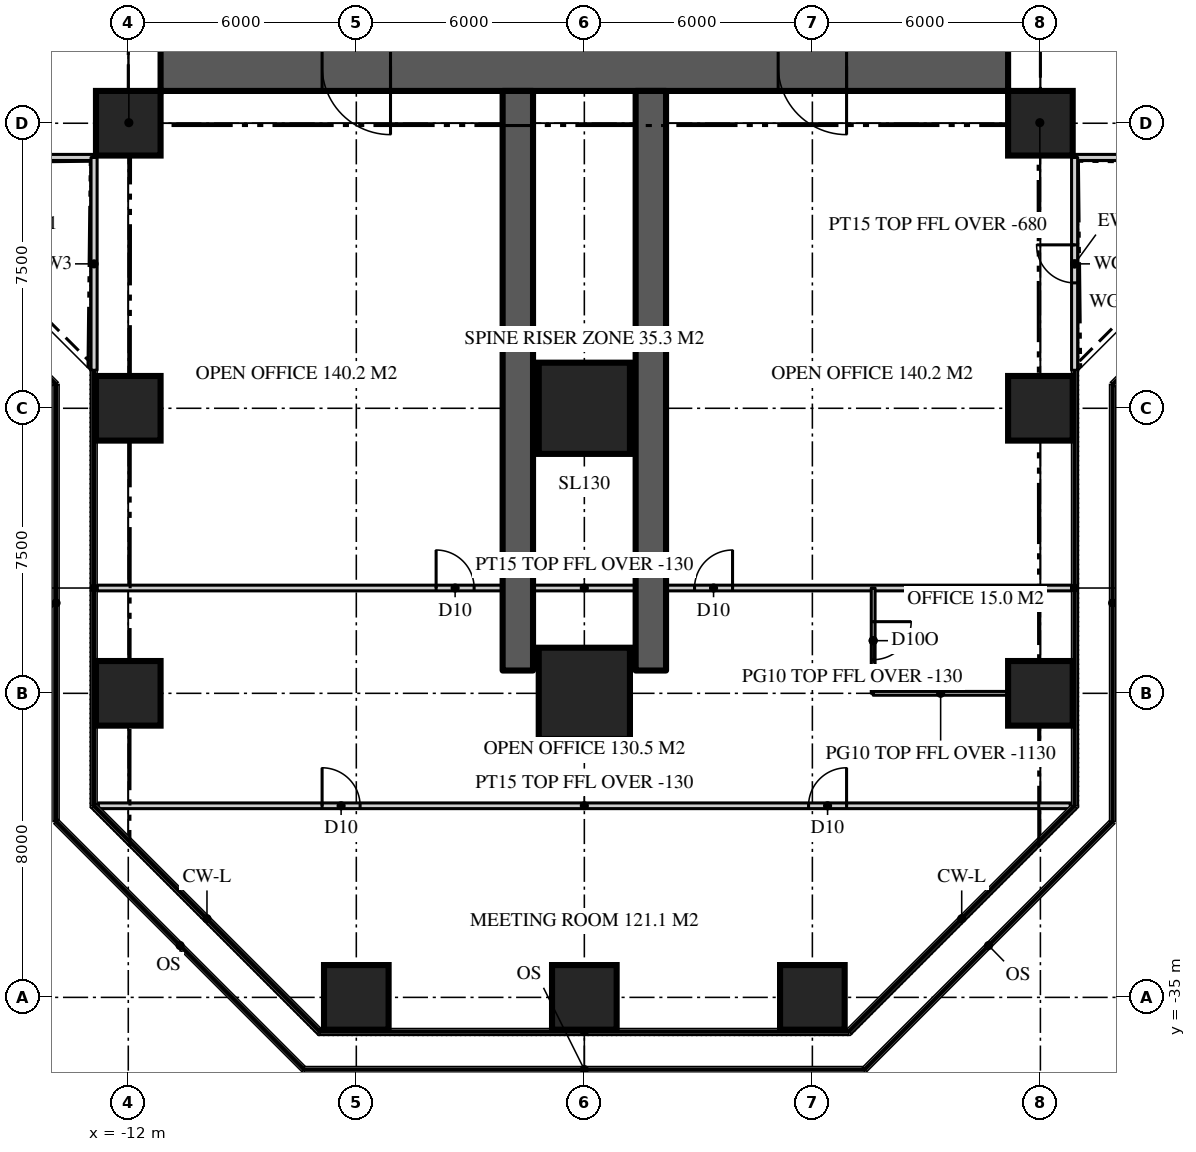
"""IFC4 building model, lengths in metres.
Left out: names, types, materials, properties, quantities, classifications, styles, units other than length and angle.
Written with IfcOpenShell. Run it as: python <this file> out.ifc"""

import sys

from ifc_helpers import new_model, si_unit, direction, frame, frame_2d, origin, origin_2d, place, context, subcontext, project, spatial, rectangle, extrude, element, fill, save


model = new_model("IFC4")
c1 = context("Model", 3, precision=1e-05, world=origin(), true_north=direction((0.0, 1.0)))
c2 = subcontext(c1, "Body", "Model", "MODEL_VIEW")
j1 = project(units=[si_unit("LENGTHUNIT", "METRE"), si_unit("PLANEANGLEUNIT", "RADIAN")], contexts=[c1])
p1 = place(None, origin())
s1 = spatial("IfcSite", under=j1, at=p1, CompositionType="ELEMENT")
p2 = place(p1, origin())
s2 = spatial("IfcBuilding", under=s1, at=p2, CompositionType="ELEMENT")
p3 = place(p2, frame((0.0, 0.0, 59.1)))
s3 = spatial("IfcBuildingStorey", under=s2, at=p3, CompositionType="ELEMENT", Elevation=59.1)
p4 = place(p3, frame((11.15, -10.5, 0.0), z_axis=(0.0, 0.0, 1.0), x_axis=(-1.0, 0.0, 0.0)))
e1 = element("IfcWall", 1, at=p4, inside=s3, PredefinedType="SHEAR", context=c2, shape_type="SweptSolid", body=[
    extrude(rectangle(XDim=22.3, YDim=1.3, at=frame_2d((11.15, 0.0))), origin(), (0.0, 0.0, 1.0), 3.9),
])
p5 = place(p4, frame((16.25, 0.0, 0.0)))
e2 = element("IfcOpeningElement", 2, at=p5, cuts=e1, PredefinedType="OPENING", context=c2, shape_type="SweptSolid", body=[
    extrude(rectangle(XDim=1.8, YDim=2.2, at=frame_2d((0.9, 1.1))), frame((0.0, 0.66, 0.0), z_axis=(0.0, -1.0, 0.0), x_axis=(1.0, 0.0, 0.0)), (0.0, 0.0, 1.0), 1.32),
])
p6 = place(p4, frame((4.25, 0.0, 0.0)))
e3 = element("IfcOpeningElement", 3, at=p6, cuts=e1, PredefinedType="OPENING", context=c2, shape_type="SweptSolid", body=[
    extrude(rectangle(XDim=1.8, YDim=2.2, at=frame_2d((0.9, 1.1))), frame((0.0, 0.66, 0.0), z_axis=(0.0, -1.0, 0.0), x_axis=(1.0, 0.0, 0.0)), (0.0, 0.0, 1.0), 1.32),
])
for number, where, z_axis, x_axis in (
    (4, (-1.75, -11.15, 0.0), (0.0, 0.0, 1.0), (0.0, -1.0, 0.0)),
    (5, (1.75, -11.15, 0.0), (0.0, 0.0, 1.0), (0.0, -1.0, 0.0)),
):
    element("IfcWall", number, at=place(p3, frame(where, z_axis=z_axis, x_axis=x_axis)), inside=s3, PredefinedType="SHEAR", context=c2, shape_type="SweptSolid", body=[
        extrude(rectangle(XDim=15.25, YDim=0.8, at=frame_2d((7.625, 0.0))), origin(), (0.0, 0.0, 1.0), 3.9),
    ])
for number, where, z_axis, x_axis in (
    (6, (-6.0, -35.0, 0.0), (0.0, 0.0, 1.0), (1.0, 0.0, 0.0)),
    (7, (0.0, -35.0, 0.0), (0.0, 0.0, 1.0), (1.0, 0.0, 0.0)),
    (8, (6.0, -35.0, 0.0), (0.0, 0.0, 1.0), (1.0, 0.0, 0.0)),
    (9, (-12.0, -27.0, 0.0), (0.0, 0.0, 1.0), (1.0, 0.0, 0.0)),
):
    element("IfcColumn", number, at=place(p3, frame(where, z_axis=z_axis, x_axis=x_axis)), inside=s3, PredefinedType="COLUMN", context=c2, shape_type="SweptSolid", body=[
        extrude(rectangle(XDim=1.7, YDim=1.7, at=origin_2d()), origin(), (0.0, 0.0, 1.0), 3.9),
    ])
p7 = place(p3, frame((0.0, -27.0, 0.0), z_axis=(0.0, 0.0, 1.0), x_axis=(1.0, 0.0, 0.0)))
e10 = element("IfcColumn", 10, at=p7, inside=s3, PredefinedType="COLUMN", context=c2, shape_type="SweptSolid", body=[
    extrude(rectangle(XDim=2.4, YDim=2.4, at=origin_2d()), origin(), (0.0, 0.0, 1.0), 3.9),
])
for number, where, z_axis, x_axis in (
    (11, (12.0, -27.0, 0.0), (0.0, 0.0, 1.0), (1.0, 0.0, 0.0)),
    (12, (-12.0, -19.5, 0.0), (0.0, 0.0, 1.0), (1.0, 0.0, 0.0)),
):
    element("IfcColumn", number, at=place(p3, frame(where, z_axis=z_axis, x_axis=x_axis)), inside=s3, PredefinedType="COLUMN", context=c2, shape_type="SweptSolid", body=[
        extrude(rectangle(XDim=1.7, YDim=1.7, at=origin_2d()), origin(), (0.0, 0.0, 1.0), 3.9),
    ])
p8 = place(p3, frame((0.0, -19.5, 0.0), z_axis=(0.0, 0.0, 1.0), x_axis=(1.0, 0.0, 0.0)))
e13 = element("IfcColumn", 13, at=p8, inside=s3, PredefinedType="COLUMN", context=c2, shape_type="SweptSolid", body=[
    extrude(rectangle(XDim=2.4, YDim=2.4, at=origin_2d()), origin(), (0.0, 0.0, 1.0), 3.9),
])
for number, where, z_axis, x_axis in (
    (14, (12.0, -19.5, 0.0), (0.0, 0.0, 1.0), (1.0, 0.0, 0.0)),
    (15, (-12.0, -12.0, 0.0), (0.0, 0.0, 1.0), (1.0, 0.0, 0.0)),
    (16, (12.0, -12.0, 0.0), (0.0, 0.0, 1.0), (1.0, 0.0, 0.0)),
):
    element("IfcColumn", number, at=place(p3, frame(where, z_axis=z_axis, x_axis=x_axis)), inside=s3, PredefinedType="COLUMN", context=c2, shape_type="SweptSolid", body=[
        extrude(rectangle(XDim=1.7, YDim=1.7, at=origin_2d()), origin(), (0.0, 0.0, 1.0), 3.9),
    ])
p9 = place(p3, frame((12.9, -12.9, 0.0), z_axis=(0.0, 0.0, 1.0), x_axis=(1.0, 0.0, 0.0)))
e17 = element("IfcWall", 17, at=p9, inside=s3, PredefinedType="SOLIDWALL", context=c2, shape_type="SweptSolid", body=[
    extrude(rectangle(XDim=5.6, YDim=0.16, at=frame_2d((2.8, 0.0))), origin(), (0.0, 0.0, 1.0), 3.77),
])
p10 = place(p3, frame((-18.5, -12.9, 0.0), z_axis=(0.0, 0.0, 1.0), x_axis=(1.0, 0.0, 0.0)))
e18 = element("IfcWall", 18, at=p10, inside=s3, PredefinedType="SOLIDWALL", context=c2, shape_type="SweptSolid", body=[
    extrude(rectangle(XDim=5.6, YDim=0.16, at=frame_2d((2.8, 0.0))), origin(), (0.0, 0.0, 1.0), 3.77),
])
p11 = place(p10, frame((2.3, 0.0, 0.0)))
e19 = element("IfcOpeningElement", 19, at=p11, cuts=e18, PredefinedType="OPENING", context=c2, shape_type="SweptSolid", body=[
    extrude(rectangle(XDim=1.0, YDim=2.2, at=frame_2d((0.5, 1.1))), frame((0.0, 0.09, 0.0), z_axis=(0.0, -1.0, 0.0), x_axis=(1.0, 0.0, 0.0)), (0.0, 0.0, 1.0), 0.18),
])
p12 = place(p3, frame((-12.9, -12.9, 0.0), z_axis=(0.0, 0.0, 1.0), x_axis=(0.0, -1.0, 0.0)))
e20 = element("IfcWall", 20, at=p12, inside=s3, PredefinedType="SOLIDWALL", context=c2, shape_type="SweptSolid", body=[
    extrude(rectangle(XDim=5.6, YDim=0.16, at=frame_2d((2.8, 0.0))), origin(), (0.0, 0.0, 1.0), 3.77),
])
p13 = place(p3, frame((12.9, -18.5, 0.0), z_axis=(0.0, 0.0, 1.0), x_axis=(0.0, 1.0, 0.0)))
e21 = element("IfcWall", 21, at=p13, inside=s3, PredefinedType="SOLIDWALL", context=c2, shape_type="SweptSolid", body=[
    extrude(rectangle(XDim=5.6, YDim=0.16, at=frame_2d((2.8, 0.0))), origin(), (0.0, 0.0, 1.0), 3.77),
])
p14 = place(p13, frame((2.3, 0.0, 0.0)))
e22 = element("IfcOpeningElement", 22, at=p14, cuts=e21, PredefinedType="OPENING", context=c2, shape_type="SweptSolid", body=[
    extrude(rectangle(XDim=1.0, YDim=2.2, at=frame_2d((0.5, 1.1))), frame((0.0, 0.09, 0.0), z_axis=(0.0, -1.0, 0.0), x_axis=(1.0, 0.0, 0.0)), (0.0, 0.0, 1.0), 0.18),
])
p15 = place(p3, frame((-12.82, -24.229, 0.0), z_axis=(0.0, 0.0, 1.0), x_axis=(1.0, 0.0, 0.0)))
e23 = element("IfcWall", 23, at=p15, inside=s3, PredefinedType="PARTITIONING", context=c2, shape_type="SweptSolid", body=[
    extrude(rectangle(XDim=25.64, YDim=0.15, at=frame_2d((12.82, 0.0))), origin(), (0.0, 0.0, 1.0), 3.77),
])
p16 = place(p15, frame((15.72, 0.0, 0.0)))
e24 = element("IfcOpeningElement", 24, at=p16, cuts=e23, PredefinedType="OPENING", context=c2, shape_type="SweptSolid", body=[
    extrude(rectangle(XDim=1.0, YDim=2.2, at=frame_2d((0.5, 1.1))), frame((0.0, 0.085, 0.0), z_axis=(0.0, -1.0, 0.0), x_axis=(1.0, 0.0, 0.0)), (0.0, 0.0, 1.0), 0.17),
])
p17 = place(p15, frame((8.92, 0.0, 0.0)))
e25 = element("IfcOpeningElement", 25, at=p17, cuts=e23, PredefinedType="OPENING", context=c2, shape_type="SweptSolid", body=[
    extrude(rectangle(XDim=1.0, YDim=2.2, at=frame_2d((0.5, 1.1))), frame((0.0, 0.085, 0.0), z_axis=(0.0, -1.0, 0.0), x_axis=(1.0, 0.0, 0.0)), (0.0, 0.0, 1.0), 0.17),
])
p18 = place(p3, frame((-12.786, -29.959, 0.0), z_axis=(0.0, 0.0, 1.0), x_axis=(1.0, 0.0, 0.0)))
e26 = element("IfcWall", 26, at=p18, inside=s3, PredefinedType="PARTITIONING", context=c2, shape_type="SweptSolid", body=[
    extrude(rectangle(XDim=25.573, YDim=0.15, at=frame_2d((12.786, 0.0))), origin(), (0.0, 0.0, 1.0), 3.77),
])
p19 = place(p18, frame((18.687, 0.0, 0.0)))
e27 = element("IfcOpeningElement", 27, at=p19, cuts=e26, PredefinedType="OPENING", context=c2, shape_type="SweptSolid", body=[
    extrude(rectangle(XDim=1.0, YDim=2.2, at=frame_2d((0.5, 1.1))), frame((0.0, 0.085, 0.0), z_axis=(0.0, -1.0, 0.0), x_axis=(1.0, 0.0, 0.0)), (0.0, 0.0, 1.0), 0.17),
])
p20 = place(p18, frame((5.886, 0.0, 0.0)))
e28 = element("IfcOpeningElement", 28, at=p20, cuts=e26, PredefinedType="OPENING", context=c2, shape_type="SweptSolid", body=[
    extrude(rectangle(XDim=1.0, YDim=2.2, at=frame_2d((0.5, 1.1))), frame((0.0, 0.085, 0.0), z_axis=(0.0, -1.0, 0.0), x_axis=(1.0, 0.0, 0.0)), (0.0, 0.0, 1.0), 0.17),
])
p21 = place(p3, frame((7.6, -24.229, 0.0), z_axis=(0.0, 0.0, 1.0), x_axis=(0.0, -1.0, 0.0)))
e29 = element("IfcWall", 29, at=p21, inside=s3, PredefinedType="PARTITIONING", context=c2, shape_type="SweptSolid", body=[
    extrude(rectangle(XDim=2.771, YDim=0.1, at=frame_2d((1.385, 0.0))), origin(), (0.0, 0.0, 1.0), 3.77),
])
p22 = place(p21, frame((0.885, 0.0, 0.0)))
e30 = element("IfcOpeningElement", 30, at=p22, cuts=e29, PredefinedType="OPENING", context=c2, shape_type="SweptSolid", body=[
    extrude(rectangle(XDim=1.0, YDim=2.2, at=frame_2d((0.5, 1.1))), frame((0.0, 0.06, 0.0), z_axis=(0.0, -1.0, 0.0), x_axis=(1.0, 0.0, 0.0)), (0.0, 0.0, 1.0), 0.12),
])
p23 = place(p3, frame((7.6, -27.0, 0.0), z_axis=(0.0, 0.0, 1.0), x_axis=(1.0, 0.0, 0.0)))
e31 = element("IfcWall", 31, at=p23, inside=s3, PredefinedType="PARTITIONING", context=c2, shape_type="SweptSolid", body=[
    extrude(rectangle(XDim=3.55, YDim=0.1, at=frame_2d((1.775, 0.0))), origin(), (0.0, 0.0, 1.0), 2.77),
])
for number, where, z_axis, x_axis in (
    (32, (-11.15, -11.15, 0.0), (0.0, 0.0, 1.0), (-0.707, -0.707, 0.0)),
    (33, (11.15, -11.15, 0.0), (0.0, 0.0, 1.0), (0.707, -0.707, 0.0)),
):
    element("IfcWall", number, at=place(p3, frame(where, z_axis=z_axis, x_axis=x_axis)), inside=s3, PredefinedType="PARTITIONING", context=c2, shape_type="SweptSolid", body=[
        extrude(rectangle(XDim=2.362, YDim=0.15, at=frame_2d((1.181, 0.0))), origin(), (0.0, 0.0, 1.0), 3.22),
    ])
p24 = place(p14, origin())
e34 = element("IfcDoor", 34, at=p24, inside=s3, OperationType="SINGLE_SWING_RIGHT", PredefinedType="DOOR", context=c2, shape_type="SweptSolid", body=[
    extrude(rectangle(XDim=1.0, YDim=2.2, at=frame_2d((0.5, 1.1))), frame((0.0, 0.025, 0.0), z_axis=(0.0, -1.0, 0.0), x_axis=(1.0, 0.0, 0.0)), (0.0, 0.0, 1.0), 0.05),
])
fill(e22, e34)
p25 = place(p5, origin())
e35 = element("IfcDoor", 35, at=p25, inside=s3, OperationType="DOUBLE_DOOR_DOUBLE_SWING", PredefinedType="DOOR", context=c2, shape_type="SweptSolid", body=[
    extrude(rectangle(XDim=1.8, YDim=2.2, at=frame_2d((0.9, 1.1))), frame((0.0, 0.025, 0.0), z_axis=(0.0, -1.0, 0.0), x_axis=(1.0, 0.0, 0.0)), (0.0, 0.0, 1.0), 0.05),
])
fill(e2, e35)
p26 = place(p6, origin())
e36 = element("IfcDoor", 36, at=p26, inside=s3, OperationType="DOUBLE_DOOR_DOUBLE_SWING", PredefinedType="DOOR", context=c2, shape_type="SweptSolid", body=[
    extrude(rectangle(XDim=1.8, YDim=2.2, at=frame_2d((0.9, 1.1))), frame((0.0, 0.025, 0.0), z_axis=(0.0, -1.0, 0.0), x_axis=(1.0, 0.0, 0.0)), (0.0, 0.0, 1.0), 0.05),
])
fill(e3, e36)
p27 = place(p16, origin())
e37 = element("IfcDoor", 37, at=p27, inside=s3, OperationType="SINGLE_SWING_RIGHT", PredefinedType="DOOR", context=c2, shape_type="SweptSolid", body=[
    extrude(rectangle(XDim=1.0, YDim=2.2, at=frame_2d((0.5, 1.1))), frame((0.0, 0.025, 0.0), z_axis=(0.0, -1.0, 0.0), x_axis=(1.0, 0.0, 0.0)), (0.0, 0.0, 1.0), 0.05),
])
fill(e24, e37)
p28 = place(p17, origin())
e38 = element("IfcDoor", 38, at=p28, inside=s3, OperationType="SINGLE_SWING_LEFT", PredefinedType="DOOR", context=c2, shape_type="SweptSolid", body=[
    extrude(rectangle(XDim=1.0, YDim=2.2, at=frame_2d((0.5, 1.1))), frame((0.0, 0.025, 0.0), z_axis=(0.0, -1.0, 0.0), x_axis=(1.0, 0.0, 0.0)), (0.0, 0.0, 1.0), 0.05),
])
fill(e25, e38)
p29 = place(p19, origin())
e39 = element("IfcDoor", 39, at=p29, inside=s3, OperationType="SINGLE_SWING_RIGHT", PredefinedType="DOOR", context=c2, shape_type="SweptSolid", body=[
    extrude(rectangle(XDim=1.0, YDim=2.2, at=frame_2d((0.5, 1.1))), frame((0.0, 0.025, 0.0), z_axis=(0.0, -1.0, 0.0), x_axis=(1.0, 0.0, 0.0)), (0.0, 0.0, 1.0), 0.05),
])
fill(e27, e39)
p30 = place(p20, origin())
e40 = element("IfcDoor", 40, at=p30, inside=s3, OperationType="SINGLE_SWING_LEFT", PredefinedType="DOOR", context=c2, shape_type="SweptSolid", body=[
    extrude(rectangle(XDim=1.0, YDim=2.2, at=frame_2d((0.5, 1.1))), frame((0.0, 0.025, 0.0), z_axis=(0.0, -1.0, 0.0), x_axis=(1.0, 0.0, 0.0)), (0.0, 0.0, 1.0), 0.05),
])
fill(e28, e40)
p31 = place(p22, origin())
e41 = element("IfcDoor", 41, at=p31, inside=s3, OperationType="SINGLE_SWING_LEFT", PredefinedType="DOOR", context=c2, shape_type="SweptSolid", body=[
    extrude(rectangle(XDim=1.0, YDim=2.2, at=frame_2d((0.5, 1.1))), frame((0.0, 0.025, 0.0), z_axis=(0.0, -1.0, 0.0), x_axis=(1.0, 0.0, 0.0)), (0.0, 0.0, 1.0), 0.05),
])
fill(e30, e41)
save(model, sys.argv[1])
